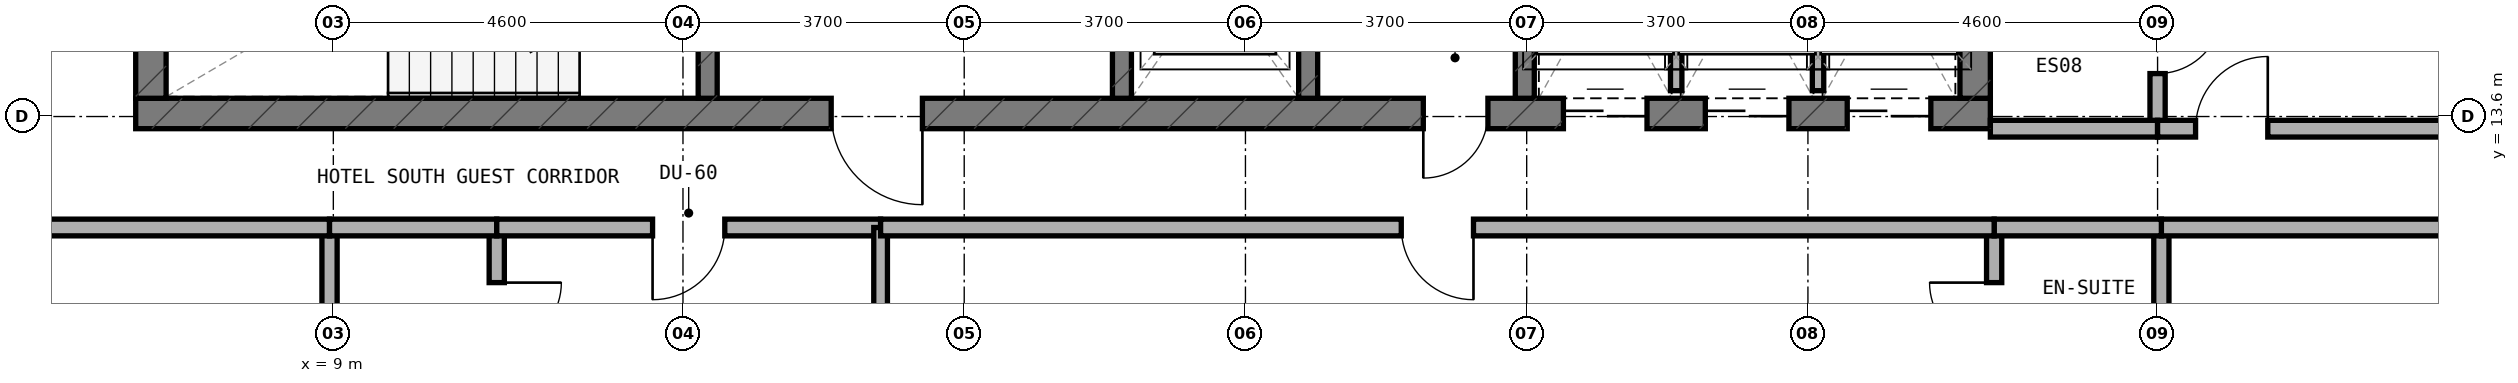
"""IFC4 building model, lengths in metres.
Left out: names, types, materials, properties, quantities, classifications, styles, units other than length and angle.
Written with IfcOpenShell. Run it as: python <this file> out.ifc"""

import sys

from ifc_helpers import new_model, si_unit, direction, frame, frame_2d, origin, place, context, subcontext, project, spatial, rectangle, extrude, element, fill, save


model = new_model("IFC4")
c1 = context("Model", 3, precision=1e-05, world=origin(), true_north=direction((0.0, 1.0)))
c2 = subcontext(c1, "Body", "Model", "MODEL_VIEW")
j1 = project(units=[si_unit("LENGTHUNIT", "METRE"), si_unit("PLANEANGLEUNIT", "RADIAN")], contexts=[c1])
p1 = place(None, origin())
s1 = spatial("IfcSite", under=j1, at=p1, CompositionType="ELEMENT")
p2 = place(p1, origin())
s2 = spatial("IfcBuilding", under=s1, at=p2, CompositionType="ELEMENT")
p3 = place(p2, frame((0.0, 0.0, 250.4)))
s3 = spatial("IfcBuildingStorey", under=s2, at=p3, CompositionType="ELEMENT", Elevation=250.4)
p4 = place(p3, frame((6.4, 13.64, 0.0), z_axis=(0.0, 0.0, 1.0), x_axis=(1.0, 0.0, 0.0)))
e1 = element("IfcWall", 1, at=p4, inside=s3, PredefinedType="SHEAR", context=c2, shape_type="SweptSolid", body=[
    extrude(rectangle(XDim=24.4, YDim=0.4, at=frame_2d((12.2, 0.0))), origin(), (0.0, 0.0, 1.0), 3.6),
])
p5 = place(p4, frame((9.15, 0.0, 0.0)))
e2 = element("IfcOpeningElement", 2, at=p5, cuts=e1, PredefinedType="OPENING", context=c2, shape_type="SweptSolid", body=[
    extrude(rectangle(XDim=1.2, YDim=2.15, at=frame_2d((0.6, 1.075))), frame((0.0, 0.21, 0.0), z_axis=(0.0, -1.0, 0.0), x_axis=(1.0, 0.0, 0.0)), (0.0, 0.0, 1.0), 0.42),
])
p6 = place(p4, frame((16.94, 0.0, 0.0)))
e3 = element("IfcOpeningElement", 3, at=p6, cuts=e1, PredefinedType="OPENING", context=c2, shape_type="SweptSolid", body=[
    extrude(rectangle(XDim=0.85, YDim=2.1, at=frame_2d((0.425, 1.05))), frame((0.0, 0.21, 0.0), z_axis=(0.0, -1.0, 0.0), x_axis=(1.0, 0.0, 0.0)), (0.0, 0.0, 1.0), 0.42),
])
p7 = place(p4, frame((18.783, 0.0, 0.0)))
e4 = element("IfcOpeningElement", 4, at=p7, cuts=e1, PredefinedType="OPENING", context=c2, shape_type="SweptSolid", body=[
    extrude(rectangle(XDim=1.1, YDim=2.15, at=frame_2d((0.55, 1.075))), frame((0.0, 0.21, 0.0), z_axis=(0.0, -1.0, 0.0), x_axis=(1.0, 0.0, 0.0)), (0.0, 0.0, 1.0), 0.42),
])
p8 = place(p4, frame((20.65, 0.0, 0.0)))
e5 = element("IfcOpeningElement", 5, at=p8, cuts=e1, PredefinedType="OPENING", context=c2, shape_type="SweptSolid", body=[
    extrude(rectangle(XDim=1.1, YDim=2.15, at=frame_2d((0.55, 1.075))), frame((0.0, 0.21, 0.0), z_axis=(0.0, -1.0, 0.0), x_axis=(1.0, 0.0, 0.0)), (0.0, 0.0, 1.0), 0.42),
])
p9 = place(p4, frame((22.517, 0.0, 0.0)))
e6 = element("IfcOpeningElement", 6, at=p9, cuts=e1, PredefinedType="OPENING", context=c2, shape_type="SweptSolid", body=[
    extrude(rectangle(XDim=1.1, YDim=2.15, at=frame_2d((0.55, 1.075))), frame((0.0, 0.21, 0.0), z_axis=(0.0, -1.0, 0.0), x_axis=(1.0, 0.0, 0.0)), (0.0, 0.0, 1.0), 0.42),
])
for number, where, z_axis, x_axis in (
    (7, (6.6, 13.84, 0.0), (0.0, 0.0, 1.0), (0.0, 1.0, 0.0)),
    (8, (30.6, 13.84, 0.0), (0.0, 0.0, 1.0), (0.0, 1.0, 0.0)),
):
    element("IfcWall", number, at=place(p3, frame(where, z_axis=z_axis, x_axis=x_axis)), inside=s3, PredefinedType="SHEAR", context=c2, shape_type="SweptSolid", body=[
        extrude(rectangle(XDim=3.16, YDim=0.4, at=frame_2d((1.58, 0.0))), origin(), (0.0, 0.0, 1.0), 3.6),
    ])
p10 = place(p3, frame((13.925, 13.84, 0.0), z_axis=(0.0, 0.0, 1.0), x_axis=(0.0, 1.0, 0.0)))
e9 = element("IfcWall", 9, at=p10, inside=s3, PredefinedType="STANDARD", context=c2, shape_type="SweptSolid", body=[
    extrude(rectangle(XDim=3.16, YDim=0.25, at=frame_2d((1.58, 0.0))), origin(), (0.0, 0.0, 1.0), 3.32),
])
p11 = place(p10, frame((0.98, 0.0, 0.0)))
e10 = element("IfcOpeningElement", 10, at=p11, cuts=e9, PredefinedType="OPENING", context=c2, shape_type="SweptSolid", body=[
    extrude(rectangle(XDim=1.1, YDim=2.15, at=frame_2d((0.55, 1.075))), frame((0.0, 0.135, 0.0), z_axis=(0.0, -1.0, 0.0), x_axis=(1.0, 0.0, 0.0)), (0.0, 0.0, 1.0), 0.27),
])
p12 = place(p3, frame((19.375, 13.84, 0.0), z_axis=(0.0, 0.0, 1.0), x_axis=(0.0, 1.0, 0.0)))
e11 = element("IfcWall", 11, at=p12, inside=s3, PredefinedType="STANDARD", context=c2, shape_type="SweptSolid", body=[
    extrude(rectangle(XDim=3.16, YDim=0.25, at=frame_2d((1.58, 0.0))), origin(), (0.0, 0.0, 1.0), 3.32),
])
p13 = place(p12, frame((0.98, 0.0, 0.0)))
e12 = element("IfcOpeningElement", 12, at=p13, cuts=e11, PredefinedType="OPENING", context=c2, shape_type="SweptSolid", body=[
    extrude(rectangle(XDim=1.1, YDim=2.15, at=frame_2d((0.55, 1.075))), frame((0.0, 0.135, 0.0), z_axis=(0.0, -1.0, 0.0), x_axis=(1.0, 0.0, 0.0)), (0.0, 0.0, 1.0), 0.27),
])
for number, where, z_axis, x_axis in (
    (13, (21.825, 13.84, 0.0), (0.0, 0.0, 1.0), (0.0, 1.0, 0.0)),
    (14, (24.675, 13.84, 0.0), (0.0, 0.0, 1.0), (0.0, 1.0, 0.0)),
):
    element("IfcWall", number, at=place(p3, frame(where, z_axis=z_axis, x_axis=x_axis)), inside=s3, PredefinedType="STANDARD", context=c2, shape_type="SweptSolid", body=[
        extrude(rectangle(XDim=3.16, YDim=0.25, at=frame_2d((1.58, 0.0))), origin(), (0.0, 0.0, 1.0), 3.32),
    ])
p14 = place(p3, frame((26.667, 13.94, 0.0), z_axis=(0.0, 0.0, 1.0), x_axis=(0.0, 1.0, 0.0)))
e15 = element("IfcWall", 15, at=p14, inside=s3, PredefinedType="PARTITIONING", context=c2, shape_type="SweptSolid", body=[
    extrude(rectangle(XDim=2.96, YDim=0.15, at=frame_2d((1.48, 0.0))), origin(), (0.0, 0.0, 1.0), 3.32),
])
p15 = place(p3, frame((28.533, 13.94, 0.0), z_axis=(0.0, 0.0, 1.0), x_axis=(0.0, 1.0, 0.0)))
e16 = element("IfcWall", 16, at=p15, inside=s3, PredefinedType="PARTITIONING", context=c2, shape_type="SweptSolid", body=[
    extrude(rectangle(XDim=2.96, YDim=0.15, at=frame_2d((1.48, 0.0))), origin(), (0.0, 0.0, 1.0), 2.745),
])
p16 = place(p3, frame((11.15, 9.94, 0.0), z_axis=(0.0, 0.0, 1.0), x_axis=(0.0, 1.0, 0.0)))
e17 = element("IfcWall", 17, at=p16, inside=s3, PredefinedType="PLUMBINGWALL", context=c2, shape_type="SweptSolid", body=[
    extrude(rectangle(XDim=2.1, YDim=0.2, at=frame_2d((1.05, 0.0))), origin(), (0.0, 0.0, 1.0), 3.055),
])
p17 = place(p16, frame((0.625, 0.0, 0.0)))
e18 = element("IfcOpeningElement", 18, at=p17, cuts=e17, PredefinedType="OPENING", context=c2, shape_type="SweptSolid", body=[
    extrude(rectangle(XDim=0.85, YDim=2.1, at=frame_2d((0.425, 1.05))), frame((0.0, 0.11, 0.0), z_axis=(0.0, -1.0, 0.0), x_axis=(1.0, 0.0, 0.0)), (0.0, 0.0, 1.0), 0.22),
])
p18 = place(p3, frame((8.95, 9.94, 0.0), z_axis=(0.0, 0.0, 1.0), x_axis=(0.0, 1.0, 0.0)))
e19 = element("IfcWall", 19, at=p18, inside=s3, PredefinedType="PLUMBINGWALL", context=c2, shape_type="SweptSolid", body=[
    extrude(rectangle(XDim=2.1, YDim=0.2, at=frame_2d((1.05, 0.0))), origin(), (0.0, 0.0, 1.0), 3.055),
])
p19 = place(p3, frame((3.36, 12.14, 0.0), z_axis=(0.0, 0.0, 1.0), x_axis=(1.0, 0.0, 0.0)))
e20 = element("IfcWall", 20, at=p19, inside=s3, PredefinedType="SOLIDWALL", context=c2, shape_type="SweptSolid", body=[
    extrude(rectangle(XDim=5.59, YDim=0.22, at=frame_2d((2.795, 0.0))), origin(), (0.0, 0.0, 1.0), 2.745),
])
p20 = place(p3, frame((8.95, 12.14, 0.0), z_axis=(0.0, 0.0, 1.0), x_axis=(1.0, 0.0, 0.0)))
e21 = element("IfcWall", 21, at=p20, inside=s3, PredefinedType="SOLIDWALL", context=c2, shape_type="SweptSolid", body=[
    extrude(rectangle(XDim=2.2, YDim=0.22, at=frame_2d((1.1, 0.0))), origin(), (0.0, 0.0, 1.0), 3.32),
])
p21 = place(p3, frame((11.15, 12.14, 0.0), z_axis=(0.0, 0.0, 1.0), x_axis=(1.0, 0.0, 0.0)))
e22 = element("IfcWall", 22, at=p21, inside=s3, PredefinedType="SOLIDWALL", context=c2, shape_type="SweptSolid", body=[
    extrude(rectangle(XDim=5.05, YDim=0.22, at=frame_2d((2.525, 0.0))), origin(), (0.0, 0.0, 1.0), 2.745),
])
p22 = place(p21, frame((2.05, 0.0, 0.0)))
e23 = element("IfcOpeningElement", 23, at=p22, cuts=e22, PredefinedType="OPENING", context=c2, shape_type="SweptSolid", body=[
    extrude(rectangle(XDim=0.95, YDim=2.1, at=frame_2d((0.475, 1.05))), frame((0.0, 0.12, 0.0), z_axis=(0.0, -1.0, 0.0), x_axis=(1.0, 0.0, 0.0)), (0.0, 0.0, 1.0), 0.24),
])
p23 = place(p3, frame((16.2, 6.86, 0.0), z_axis=(0.0, 0.0, 1.0), x_axis=(0.0, 1.0, 0.0)))
e24 = element("IfcWall", 24, at=p23, inside=s3, PredefinedType="SOLIDWALL", context=c2, shape_type="SweptSolid", body=[
    extrude(rectangle(XDim=5.28, YDim=0.18, at=frame_2d((2.64, 0.0))), origin(), (0.0, 0.0, 1.0), 2.745),
])
p24 = place(p3, frame((30.85, 9.94, 0.0), z_axis=(0.0, 0.0, 1.0), x_axis=(0.0, 1.0, 0.0)))
e25 = element("IfcWall", 25, at=p24, inside=s3, PredefinedType="PLUMBINGWALL", context=c2, shape_type="SweptSolid", body=[
    extrude(rectangle(XDim=2.1, YDim=0.2, at=frame_2d((1.05, 0.0))), origin(), (0.0, 0.0, 1.0), 3.055),
])
p25 = place(p24, frame((0.625, 0.0, 0.0)))
e26 = element("IfcOpeningElement", 26, at=p25, cuts=e25, PredefinedType="OPENING", context=c2, shape_type="SweptSolid", body=[
    extrude(rectangle(XDim=0.85, YDim=2.1, at=frame_2d((0.425, 1.05))), frame((0.0, 0.11, 0.0), z_axis=(0.0, -1.0, 0.0), x_axis=(1.0, 0.0, 0.0)), (0.0, 0.0, 1.0), 0.22),
])
p26 = place(p3, frame((33.05, 9.94, 0.0), z_axis=(0.0, 0.0, 1.0), x_axis=(0.0, 1.0, 0.0)))
e27 = element("IfcWall", 27, at=p26, inside=s3, PredefinedType="PLUMBINGWALL", context=c2, shape_type="SweptSolid", body=[
    extrude(rectangle(XDim=2.1, YDim=0.2, at=frame_2d((1.05, 0.0))), origin(), (0.0, 0.0, 1.0), 3.055),
])
p27 = place(p3, frame((33.05, 12.14, 0.0), z_axis=(0.0, 0.0, 1.0), x_axis=(1.0, 0.0, 0.0)))
e28 = element("IfcWall", 28, at=p27, inside=s3, PredefinedType="SOLIDWALL", context=c2, shape_type="SweptSolid", body=[
    extrude(rectangle(XDim=5.59, YDim=0.22, at=frame_2d((2.795, 0.0))), origin(), (0.0, 0.0, 1.0), 2.745),
])
p28 = place(p3, frame((30.85, 12.14, 0.0), z_axis=(0.0, 0.0, 1.0), x_axis=(1.0, 0.0, 0.0)))
e29 = element("IfcWall", 29, at=p28, inside=s3, PredefinedType="SOLIDWALL", context=c2, shape_type="SweptSolid", body=[
    extrude(rectangle(XDim=2.2, YDim=0.22, at=frame_2d((1.1, 0.0))), origin(), (0.0, 0.0, 1.0), 3.32),
])
p29 = place(p3, frame((16.2, 12.14, 0.0), z_axis=(0.0, 0.0, 1.0), x_axis=(1.0, 0.0, 0.0)))
e30 = element("IfcWall", 30, at=p29, inside=s3, PredefinedType="SOLIDWALL", context=c2, shape_type="SweptSolid", body=[
    extrude(rectangle(XDim=14.65, YDim=0.22, at=frame_2d((7.325, 0.0))), origin(), (0.0, 0.0, 1.0), 2.745),
])
p30 = place(p29, frame((6.85, 0.0, 0.0)))
e31 = element("IfcOpeningElement", 31, at=p30, cuts=e30, PredefinedType="OPENING", context=c2, shape_type="SweptSolid", body=[
    extrude(rectangle(XDim=0.95, YDim=2.1, at=frame_2d((0.475, 1.05))), frame((0.0, 0.12, 0.0), z_axis=(0.0, -1.0, 0.0), x_axis=(1.0, 0.0, 0.0)), (0.0, 0.0, 1.0), 0.24),
])
p31 = place(p3, frame((33.0, 13.54, 0.0), z_axis=(0.0, 0.0, 1.0), x_axis=(0.0, 1.0, 0.0)))
e32 = element("IfcWall", 32, at=p31, inside=s3, PredefinedType="PLUMBINGWALL", context=c2, shape_type="SweptSolid", body=[
    extrude(rectangle(XDim=2.1, YDim=0.2, at=frame_2d((1.05, 0.0))), origin(), (0.0, 0.0, 1.0), 3.32),
])
p32 = place(p31, frame((0.625, 0.0, 0.0)))
e33 = element("IfcOpeningElement", 33, at=p32, cuts=e32, PredefinedType="OPENING", context=c2, shape_type="SweptSolid", body=[
    extrude(rectangle(XDim=0.85, YDim=2.1, at=frame_2d((0.425, 1.05))), frame((0.0, 0.11, 0.0), z_axis=(0.0, -1.0, 0.0), x_axis=(1.0, 0.0, 0.0)), (0.0, 0.0, 1.0), 0.22),
])
p33 = place(p3, frame((30.8, 13.44, 0.0), z_axis=(0.0, 0.0, 1.0), x_axis=(1.0, 0.0, 0.0)))
e34 = element("IfcWall", 34, at=p33, inside=s3, PredefinedType="SOLIDWALL", context=c2, shape_type="SweptSolid", body=[
    extrude(rectangle(XDim=2.2, YDim=0.22, at=frame_2d((1.1, 0.0))), origin(), (0.0, 0.0, 1.0), 3.32),
])
p34 = place(p3, frame((33.0, 13.44, 0.0), z_axis=(0.0, 0.0, 1.0), x_axis=(1.0, 0.0, 0.0)))
e35 = element("IfcWall", 35, at=p34, inside=s3, PredefinedType="SOLIDWALL", context=c2, shape_type="SweptSolid", body=[
    extrude(rectangle(XDim=5.8, YDim=0.22, at=frame_2d((2.9, 0.0))), origin(), (0.0, 0.0, 1.0), 2.745),
])
p35 = place(p34, frame((0.5, 0.0, 0.0)))
e36 = element("IfcOpeningElement", 36, at=p35, cuts=e35, PredefinedType="OPENING", context=c2, shape_type="SweptSolid", body=[
    extrude(rectangle(XDim=0.95, YDim=2.1, at=frame_2d((0.475, 1.05))), frame((0.0, 0.12, 0.0), z_axis=(0.0, -1.0, 0.0), x_axis=(1.0, 0.0, 0.0)), (0.0, 0.0, 1.0), 0.24),
])
p36 = place(p5, frame((1.2, 0.0, 0.0), z_axis=(0.0, 0.0, 1.0), x_axis=(-1.0, 0.0, 0.0)))
e37 = element("IfcDoor", 37, at=p36, inside=s3, OperationType="SINGLE_SWING_LEFT", PredefinedType="DOOR", context=c2, shape_type="SweptSolid", body=[
    extrude(rectangle(XDim=1.2, YDim=2.15, at=frame_2d((0.6, 1.075))), frame((0.0, 0.025, 0.0), z_axis=(0.0, -1.0, 0.0), x_axis=(1.0, 0.0, 0.0)), (0.0, 0.0, 1.0), 0.05),
])
fill(e2, e37)
p37 = place(p6, frame((0.85, 0.0, 0.0), z_axis=(0.0, 0.0, 1.0), x_axis=(-1.0, 0.0, 0.0)))
e38 = element("IfcDoor", 38, at=p37, inside=s3, OperationType="SINGLE_SWING_RIGHT", PredefinedType="DOOR", context=c2, shape_type="SweptSolid", body=[
    extrude(rectangle(XDim=0.85, YDim=2.1, at=frame_2d((0.425, 1.05))), frame((0.0, 0.025, 0.0), z_axis=(0.0, -1.0, 0.0), x_axis=(1.0, 0.0, 0.0)), (0.0, 0.0, 1.0), 0.05),
])
fill(e3, e38)
p38 = place(p7, frame((1.1, 0.0, 0.0), z_axis=(0.0, 0.0, 1.0), x_axis=(-1.0, 0.0, 0.0)))
e39 = element("IfcDoor", 39, at=p38, inside=s3, OperationType="DOUBLE_DOOR_SLIDING", PredefinedType="DOOR", context=c2, shape_type="SweptSolid", body=[
    extrude(rectangle(XDim=1.1, YDim=2.15, at=frame_2d((0.55, 1.075))), frame((0.0, 0.025, 0.0), z_axis=(0.0, -1.0, 0.0), x_axis=(1.0, 0.0, 0.0)), (0.0, 0.0, 1.0), 0.05),
])
fill(e4, e39)
p39 = place(p8, frame((1.1, 0.0, 0.0), z_axis=(0.0, 0.0, 1.0), x_axis=(-1.0, 0.0, 0.0)))
e40 = element("IfcDoor", 40, at=p39, inside=s3, OperationType="DOUBLE_DOOR_SLIDING", PredefinedType="DOOR", context=c2, shape_type="SweptSolid", body=[
    extrude(rectangle(XDim=1.1, YDim=2.15, at=frame_2d((0.55, 1.075))), frame((0.0, 0.025, 0.0), z_axis=(0.0, -1.0, 0.0), x_axis=(1.0, 0.0, 0.0)), (0.0, 0.0, 1.0), 0.05),
])
fill(e5, e40)
p40 = place(p9, frame((1.1, 0.0, 0.0), z_axis=(0.0, 0.0, 1.0), x_axis=(-1.0, 0.0, 0.0)))
e41 = element("IfcDoor", 41, at=p40, inside=s3, OperationType="DOUBLE_DOOR_SLIDING", PredefinedType="DOOR", context=c2, shape_type="SweptSolid", body=[
    extrude(rectangle(XDim=1.1, YDim=2.15, at=frame_2d((0.55, 1.075))), frame((0.0, 0.025, 0.0), z_axis=(0.0, -1.0, 0.0), x_axis=(1.0, 0.0, 0.0)), (0.0, 0.0, 1.0), 0.05),
])
fill(e6, e41)
p41 = place(p17, frame((0.85, 0.0, 0.0), z_axis=(0.0, 0.0, 1.0), x_axis=(-1.0, 0.0, 0.0)))
e42 = element("IfcDoor", 42, at=p41, inside=s3, OperationType="SINGLE_SWING_LEFT", PredefinedType="DOOR", context=c2, shape_type="SweptSolid", body=[
    extrude(rectangle(XDim=0.85, YDim=2.1, at=frame_2d((0.425, 1.05))), frame((0.0, 0.025, 0.0), z_axis=(0.0, -1.0, 0.0), x_axis=(1.0, 0.0, 0.0)), (0.0, 0.0, 1.0), 0.05),
])
fill(e18, e42)
p42 = place(p22, frame((0.95, 0.0, 0.0), z_axis=(0.0, 0.0, 1.0), x_axis=(-1.0, 0.0, 0.0)))
e43 = element("IfcDoor", 43, at=p42, inside=s3, OperationType="SINGLE_SWING_RIGHT", PredefinedType="DOOR", context=c2, shape_type="SweptSolid", body=[
    extrude(rectangle(XDim=0.95, YDim=2.1, at=frame_2d((0.475, 1.05))), frame((0.0, 0.025, 0.0), z_axis=(0.0, -1.0, 0.0), x_axis=(1.0, 0.0, 0.0)), (0.0, 0.0, 1.0), 0.05),
])
fill(e23, e43)
p43 = place(p25, origin())
e44 = element("IfcDoor", 44, at=p43, inside=s3, OperationType="SINGLE_SWING_RIGHT", PredefinedType="DOOR", context=c2, shape_type="SweptSolid", body=[
    extrude(rectangle(XDim=0.85, YDim=2.1, at=frame_2d((0.425, 1.05))), frame((0.0, 0.025, 0.0), z_axis=(0.0, -1.0, 0.0), x_axis=(1.0, 0.0, 0.0)), (0.0, 0.0, 1.0), 0.05),
])
fill(e26, e44)
p44 = place(p30, frame((0.95, 0.0, 0.0), z_axis=(0.0, 0.0, 1.0), x_axis=(-1.0, 0.0, 0.0)))
e45 = element("IfcDoor", 45, at=p44, inside=s3, OperationType="SINGLE_SWING_LEFT", PredefinedType="DOOR", context=c2, shape_type="SweptSolid", body=[
    extrude(rectangle(XDim=0.95, YDim=2.1, at=frame_2d((0.475, 1.05))), frame((0.0, 0.025, 0.0), z_axis=(0.0, -1.0, 0.0), x_axis=(1.0, 0.0, 0.0)), (0.0, 0.0, 1.0), 0.05),
])
fill(e31, e45)
p45 = place(p32, frame((0.85, 0.0, 0.0), z_axis=(0.0, 0.0, 1.0), x_axis=(-1.0, 0.0, 0.0)))
e46 = element("IfcDoor", 46, at=p45, inside=s3, OperationType="SINGLE_SWING_LEFT", PredefinedType="DOOR", context=c2, shape_type="SweptSolid", body=[
    extrude(rectangle(XDim=0.85, YDim=2.1, at=frame_2d((0.425, 1.05))), frame((0.0, 0.025, 0.0), z_axis=(0.0, -1.0, 0.0), x_axis=(1.0, 0.0, 0.0)), (0.0, 0.0, 1.0), 0.05),
])
fill(e33, e46)
p46 = place(p35, origin())
e47 = element("IfcDoor", 47, at=p46, inside=s3, OperationType="SINGLE_SWING_RIGHT", PredefinedType="DOOR", context=c2, shape_type="SweptSolid", body=[
    extrude(rectangle(XDim=0.95, YDim=2.1, at=frame_2d((0.475, 1.05))), frame((0.0, 0.025, 0.0), z_axis=(0.0, -1.0, 0.0), x_axis=(1.0, 0.0, 0.0)), (0.0, 0.0, 1.0), 0.05),
])
fill(e36, e47)
save(model, sys.argv[1])
